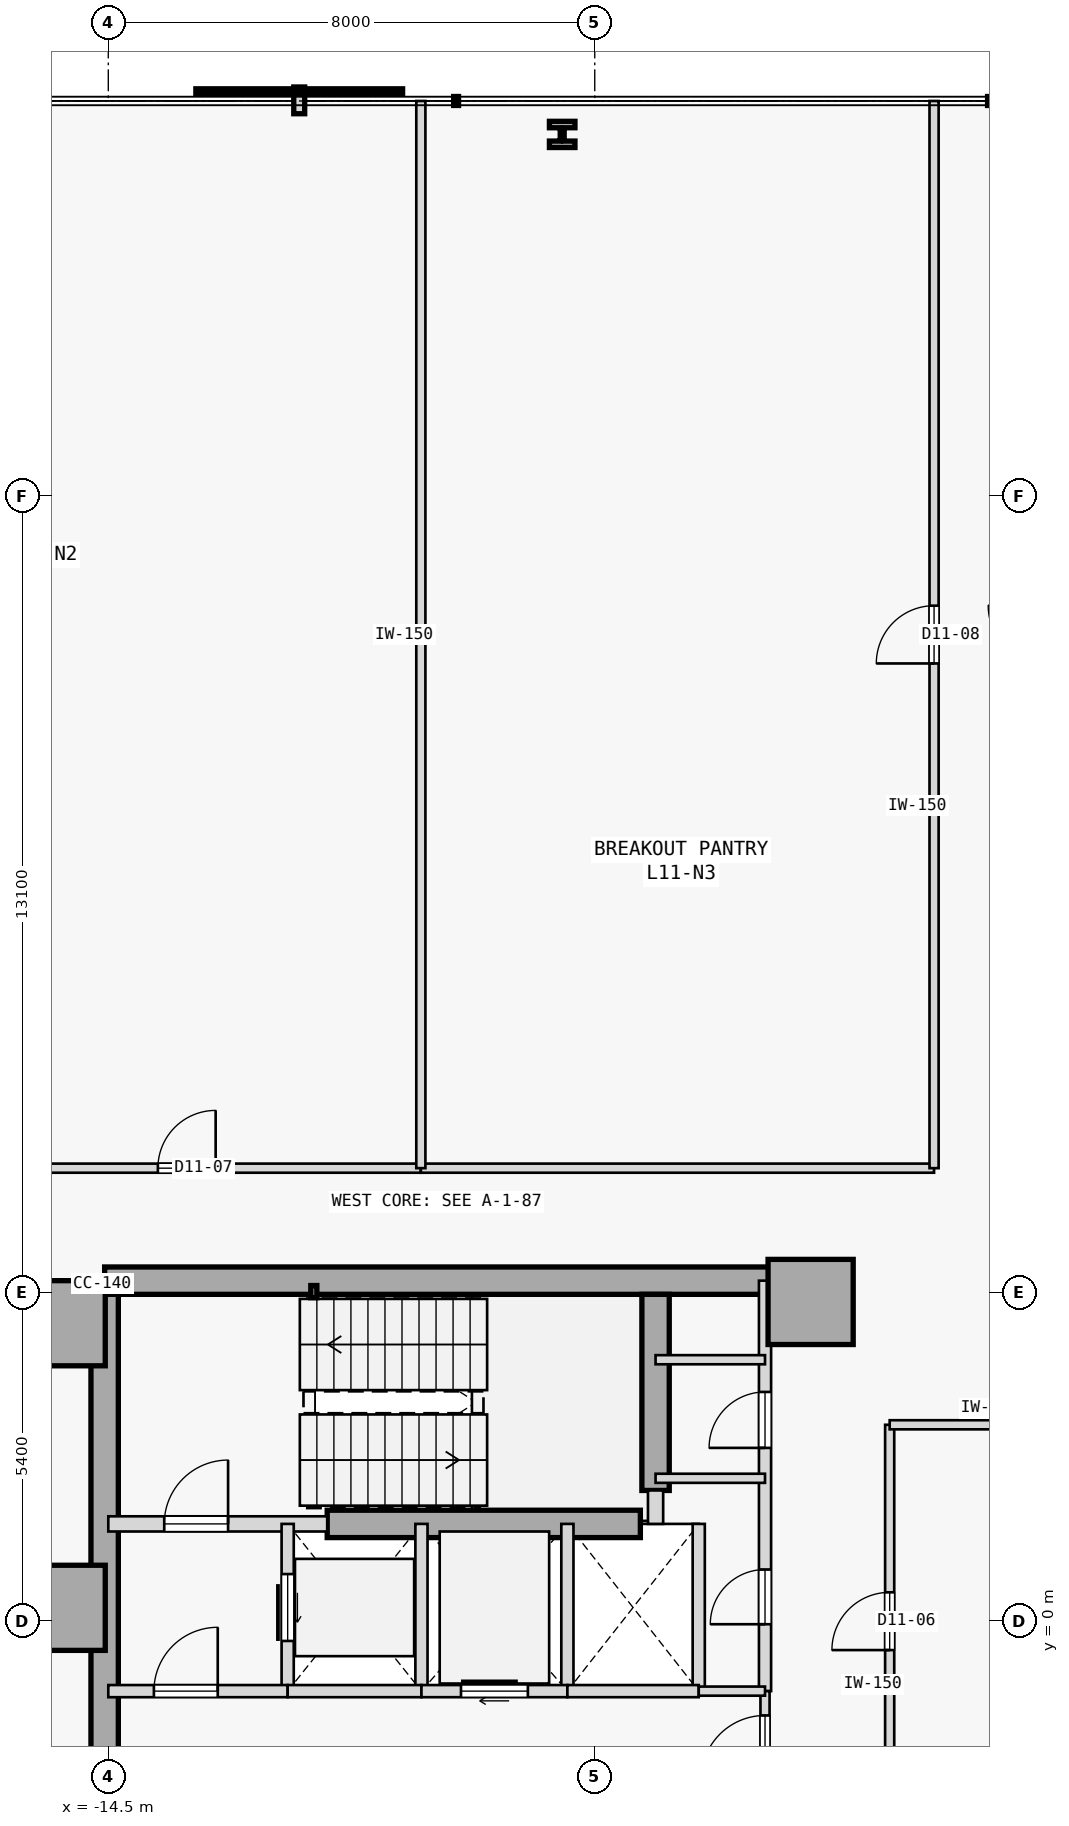
"""IFC4 building model, lengths in metres.
Left out: names, types, materials, properties, quantities, classifications, styles, units other than length and angle.
Written with IfcOpenShell. Run it as: python <this file> out.ifc"""

import sys

from ifc_helpers import new_model, si_unit, direction, frame, frame_2d, origin, origin_2d, place, context, subcontext, project, spatial, rectangle, hollow_rectangle, i_section, extrude, element, fill, save


model = new_model("IFC4")
c1 = context("Model", 3, precision=1e-05, world=origin(), true_north=direction((0.0, 1.0)))
c2 = subcontext(c1, "Body", "Model", "MODEL_VIEW")
j1 = project(units=[si_unit("LENGTHUNIT", "METRE"), si_unit("PLANEANGLEUNIT", "RADIAN")], contexts=[c1])
p1 = place(None, origin())
s1 = spatial("IfcSite", under=j1, at=p1, CompositionType="ELEMENT")
p2 = place(p1, origin())
s2 = spatial("IfcBuilding", under=s1, at=p2, CompositionType="ELEMENT")
p3 = place(p2, frame((0.0, 0.0, 48.4)))
s3 = spatial("IfcBuildingStorey", under=s2, at=p3, CompositionType="ELEMENT", Elevation=48.4)
for number, where, z_axis, x_axis in (
    (1, (-15.25, 4.9, 0.0), (0.0, 0.0, 1.0), (1.0, 0.0, 0.0)),
    (2, (-15.25, 0.22, 0.0), (0.0, 0.0, 1.0), (1.0, 0.0, 0.0)),
    (3, (-2.95, 5.25, 0.0), (0.0, 0.0, 1.0), (1.0, 0.0, 0.0)),
):
    element("IfcColumn", number, at=place(p3, frame(where, z_axis=z_axis, x_axis=x_axis)), inside=s3, PredefinedType="COLUMN", context=c2, shape_type="SweptSolid", body=[
        extrude(rectangle(XDim=1.4, YDim=1.4, at=origin_2d()), origin(), (0.0, 0.0, 1.0), 3.8),
    ])
p4 = place(p3, frame((-14.56, 5.6, 0.0), z_axis=(0.0, 0.0, 1.0), x_axis=(1.0, 0.0, 0.0)))
e4 = element("IfcWall", 4, at=p4, inside=s3, PredefinedType="SHEAR", context=c2, shape_type="SweptSolid", body=[
    extrude(rectangle(XDim=11.41, YDim=0.45, at=frame_2d((5.705, 0.0))), origin(), (0.0, 0.0, 1.0), 3.575),
])
p5 = place(p3, frame((-14.56, -5.375, 0.0), z_axis=(0.0, 0.0, 1.0), x_axis=(0.0, 1.0, 0.0)))
e5 = element("IfcWall", 5, at=p5, inside=s3, PredefinedType="SHEAR", context=c2, shape_type="SweptSolid", body=[
    extrude(rectangle(XDim=10.75, YDim=0.45, at=frame_2d((5.375, 0.0))), origin(), (0.0, 0.0, 1.0), 3.575),
])
p6 = place(p3, frame((-5.5, 2.15, 0.0), z_axis=(0.0, 0.0, 1.0), x_axis=(0.0, 1.0, 0.0)))
e6 = element("IfcWall", 6, at=p6, inside=s3, PredefinedType="SHEAR", context=c2, shape_type="SweptSolid", body=[
    extrude(rectangle(XDim=3.225, YDim=0.45, at=frame_2d((1.613, 0.0))), origin(), (0.0, 0.0, 1.0), 3.575),
])
p7 = place(p3, frame((-10.9, 1.6, 0.0), z_axis=(0.0, 0.0, 1.0), x_axis=(1.0, 0.0, 0.0)))
e7 = element("IfcWall", 7, at=p7, inside=s3, PredefinedType="SHEAR", context=c2, shape_type="SweptSolid", body=[
    extrude(rectangle(XDim=5.15, YDim=0.45, at=frame_2d((2.575, 0.0))), origin(), (0.0, 0.0, 1.0), 3.575),
])
p8 = place(p3, frame((-11.12, 5.42, 0.0), z_axis=(0.0, 0.0, 1.0), x_axis=(1.0, 0.0, 0.0)))
e8 = element("IfcColumn", 8, at=p8, inside=s3, PredefinedType="COLUMN", context=c2, shape_type="SweptSolid", body=[
    extrude(hollow_rectangle(XDim=0.1, YDim=0.2, WallThickness=0.008, at=origin_2d()), origin(), (0.0, 0.0, 1.0), 3.8),
])
p9 = place(p3, frame((-7.036, 24.45, 0.0), z_axis=(0.0, 0.0, 1.0), x_axis=(1.0, 0.0, 0.0)))
e9 = element("IfcColumn", 9, at=p9, inside=s3, PredefinedType="COLUMN", context=c2, shape_type="SweptSolid", body=[
    extrude(i_section(OverallWidth=0.42, OverallDepth=0.431, WebThickness=0.065, FlangeThickness=0.106, FilletRadius=0.015, at=origin_2d()), origin(), (0.0, 0.0, 1.0), 3.8),
])
p10 = place(p3, frame((-14.5, 1.6, 0.0), z_axis=(0.0, 0.0, 1.0), x_axis=(1.0, 0.0, 0.0)))
e10 = element("IfcWall", 10, at=p10, inside=s3, PredefinedType="STANDARD", context=c2, shape_type="SweptSolid", body=[
    extrude(rectangle(XDim=3.6, YDim=0.25, at=frame_2d((1.8, 0.0))), origin(), (0.0, 0.0, 1.0), 3.575),
])
p11 = place(p10, frame((0.92, 0.0, 0.0)))
e11 = element("IfcOpeningElement", 11, at=p11, cuts=e10, PredefinedType="OPENING", context=c2, shape_type="SweptSolid", body=[
    extrude(rectangle(XDim=1.05, YDim=2.15, at=frame_2d((0.525, 1.075))), frame((0.0, 0.135, 0.0), z_axis=(0.0, -1.0, 0.0), x_axis=(1.0, 0.0, 0.0)), (0.0, 0.0, 1.0), 0.27),
])
p12 = place(p3, frame((-5.5, 1.6, 0.0), z_axis=(0.0, 0.0, 1.0), x_axis=(0.0, 1.0, 0.0)))
e12 = element("IfcWall", 12, at=p12, inside=s3, PredefinedType="STANDARD", context=c2, shape_type="SweptSolid", body=[
    extrude(rectangle(XDim=0.55, YDim=0.25, at=frame_2d((0.275, 0.0))), origin(), (0.0, 0.0, 1.0), 3.575),
])
p13 = place(p3, frame((-3.7, -1.15, 0.0), z_axis=(0.0, 0.0, 1.0), x_axis=(0.0, 1.0, 0.0)))
e13 = element("IfcWall", 13, at=p13, inside=s3, PredefinedType="STANDARD", context=c2, shape_type="SweptSolid", body=[
    extrude(rectangle(XDim=6.75, YDim=0.2, at=frame_2d((3.375, 0.0))), origin(), (0.0, 0.0, 1.0), 3.575),
])
p14 = place(p13, frame((1.1, 0.0, 0.0)))
e14 = element("IfcOpeningElement", 14, at=p14, cuts=e13, PredefinedType="OPENING", context=c2, shape_type="SweptSolid", body=[
    extrude(rectangle(XDim=0.9, YDim=2.15, at=frame_2d((0.45, 1.075))), frame((0.0, 0.11, 0.0), z_axis=(0.0, -1.0, 0.0), x_axis=(1.0, 0.0, 0.0)), (0.0, 0.0, 1.0), 0.22),
])
p15 = place(p13, frame((4.0, 0.0, 0.0)))
e15 = element("IfcOpeningElement", 15, at=p15, cuts=e13, PredefinedType="OPENING", context=c2, shape_type="SweptSolid", body=[
    extrude(rectangle(XDim=0.92, YDim=2.15, at=frame_2d((0.46, 1.075))), frame((0.0, 0.11, 0.0), z_axis=(0.0, -1.0, 0.0), x_axis=(1.0, 0.0, 0.0)), (0.0, 0.0, 1.0), 0.22),
])
p16 = place(p3, frame((-3.7, -2.95, 0.0), z_axis=(0.0, 0.0, 1.0), x_axis=(0.0, 1.0, 0.0)))
e16 = element("IfcWall", 16, at=p16, inside=s3, PredefinedType="PARTITIONING", context=c2, shape_type="SweptSolid", body=[
    extrude(rectangle(XDim=1.8, YDim=0.15, at=frame_2d((0.9, 0.0))), origin(), (0.0, 0.0, 1.0), 3.575),
])
p17 = place(p16, frame((0.35, 0.0, 0.0)))
e17 = element("IfcOpeningElement", 17, at=p17, cuts=e16, PredefinedType="OPENING", context=c2, shape_type="SweptSolid", body=[
    extrude(rectangle(XDim=1.05, YDim=2.18, at=frame_2d((0.525, 1.09))), frame((0.0, 0.085, 0.0), z_axis=(0.0, -1.0, 0.0), x_axis=(1.0, 0.0, 0.0)), (0.0, 0.0, 1.0), 0.17),
])
p18 = place(p3, frame((-11.55, -1.15, 0.0), z_axis=(0.0, 0.0, 1.0), x_axis=(0.0, 1.0, 0.0)))
e18 = element("IfcWall", 18, at=p18, inside=s3, PredefinedType="STANDARD", context=c2, shape_type="SweptSolid", body=[
    extrude(rectangle(XDim=2.75, YDim=0.2, at=frame_2d((1.375, 0.0))), origin(), (0.0, 0.0, 1.0), 3.575),
])
p19 = place(p18, frame((0.825, 0.0, 0.0)))
e19 = element("IfcOpeningElement", 19, at=p19, cuts=e18, PredefinedType="OPENING", context=c2, shape_type="SweptSolid", body=[
    extrude(rectangle(XDim=1.1, YDim=2.15, at=frame_2d((0.55, 1.075))), frame((0.0, 0.11, 0.0), z_axis=(0.0, -1.0, 0.0), x_axis=(1.0, 0.0, 0.0)), (0.0, 0.0, 1.0), 0.22),
])
p20 = place(p3, frame((-9.35, -1.15, 0.0), z_axis=(0.0, 0.0, 1.0), x_axis=(0.0, 1.0, 0.0)))
e20 = element("IfcWall", 20, at=p20, inside=s3, PredefinedType="STANDARD", context=c2, shape_type="SweptSolid", body=[
    extrude(rectangle(XDim=2.75, YDim=0.2, at=frame_2d((1.375, 0.0))), origin(), (0.0, 0.0, 1.0), 3.575),
])
p21 = place(p3, frame((-14.5, -1.15, 0.0), z_axis=(0.0, 0.0, 1.0), x_axis=(1.0, 0.0, 0.0)))
e21 = element("IfcWall", 21, at=p21, inside=s3, PredefinedType="STANDARD", context=c2, shape_type="SweptSolid", body=[
    extrude(rectangle(XDim=2.95, YDim=0.2, at=frame_2d((1.475, 0.0))), origin(), (0.0, 0.0, 1.0), 3.575),
])
p22 = place(p21, frame((0.75, 0.0, 0.0)))
e22 = element("IfcOpeningElement", 22, at=p22, cuts=e21, PredefinedType="OPENING", context=c2, shape_type="SweptSolid", body=[
    extrude(rectangle(XDim=1.05, YDim=2.18, at=frame_2d((0.525, 1.09))), frame((0.0, 0.11, 0.0), z_axis=(0.0, -1.0, 0.0), x_axis=(1.0, 0.0, 0.0)), (0.0, 0.0, 1.0), 0.22),
])
p23 = place(p3, frame((-11.55, -1.15, 0.0), z_axis=(0.0, 0.0, 1.0), x_axis=(1.0, 0.0, 0.0)))
e23 = element("IfcWall", 23, at=p23, inside=s3, PredefinedType="STANDARD", context=c2, shape_type="SweptSolid", body=[
    extrude(rectangle(XDim=2.2, YDim=0.2, at=frame_2d((1.1, 0.0))), origin(), (0.0, 0.0, 1.0), 3.575),
])
p24 = place(p3, frame((-6.95, -1.15, 0.0), z_axis=(0.0, 0.0, 1.0), x_axis=(0.0, 1.0, 0.0)))
e24 = element("IfcWall", 24, at=p24, inside=s3, PredefinedType="STANDARD", context=c2, shape_type="SweptSolid", body=[
    extrude(rectangle(XDim=2.75, YDim=0.2, at=frame_2d((1.375, 0.0))), origin(), (0.0, 0.0, 1.0), 3.575),
])
p25 = place(p3, frame((-9.35, -1.15, 0.0), z_axis=(0.0, 0.0, 1.0), x_axis=(1.0, 0.0, 0.0)))
e25 = element("IfcWall", 25, at=p25, inside=s3, PredefinedType="STANDARD", context=c2, shape_type="SweptSolid", body=[
    extrude(rectangle(XDim=2.4, YDim=0.2, at=frame_2d((1.2, 0.0))), origin(), (0.0, 0.0, 1.0), 3.575),
])
p26 = place(p25, frame((0.65, 0.0, 0.0)))
e26 = element("IfcOpeningElement", 26, at=p26, cuts=e25, PredefinedType="OPENING", context=c2, shape_type="SweptSolid", body=[
    extrude(rectangle(XDim=1.1, YDim=2.15, at=frame_2d((0.55, 1.075))), frame((0.0, 0.11, 0.0), z_axis=(0.0, -1.0, 0.0), x_axis=(1.0, 0.0, 0.0)), (0.0, 0.0, 1.0), 0.22),
])
p27 = place(p3, frame((-4.79, -1.15, 0.0), z_axis=(0.0, 0.0, 1.0), x_axis=(0.0, 1.0, 0.0)))
e27 = element("IfcWall", 27, at=p27, inside=s3, PredefinedType="STANDARD", context=c2, shape_type="SweptSolid", body=[
    extrude(rectangle(XDim=2.75, YDim=0.2, at=frame_2d((1.375, 0.0))), origin(), (0.0, 0.0, 1.0), 3.575),
])
p28 = place(p3, frame((-6.95, -1.15, 0.0), z_axis=(0.0, 0.0, 1.0), x_axis=(1.0, 0.0, 0.0)))
e28 = element("IfcWall", 28, at=p28, inside=s3, PredefinedType="STANDARD", context=c2, shape_type="SweptSolid", body=[
    extrude(rectangle(XDim=2.16, YDim=0.2, at=frame_2d((1.08, 0.0))), origin(), (0.0, 0.0, 1.0), 3.575),
])
p29 = place(p3, frame((-4.79, -1.15, 0.0), z_axis=(0.0, 0.0, 1.0), x_axis=(1.0, 0.0, 0.0)))
e29 = element("IfcWall", 29, at=p29, inside=s3, PredefinedType="PARTITIONING", context=c2, shape_type="SweptSolid", body=[
    extrude(rectangle(XDim=1.09, YDim=0.15, at=frame_2d((0.545, 0.0))), origin(), (0.0, 0.0, 1.0), 3.575),
])
for number, where, z_axis, x_axis in (
    (30, (-5.5, 4.3, 0.0), (0.0, 0.0, 1.0), (1.0, 0.0, 0.0)),
    (31, (-5.5, 2.35, 0.0), (0.0, 0.0, 1.0), (1.0, 0.0, 0.0)),
):
    element("IfcWall", number, at=place(p3, frame(where, z_axis=z_axis, x_axis=x_axis)), inside=s3, PredefinedType="PARTITIONING", context=c2, shape_type="SweptSolid", body=[
        extrude(rectangle(XDim=1.8, YDim=0.15, at=frame_2d((0.9, 0.0))), origin(), (0.0, 0.0, 1.0), 3.575),
    ])
p30 = place(p3, frame((-1.65, -3.23, 0.0), z_axis=(0.0, 0.0, 1.0), x_axis=(0.0, 1.0, 0.0)))
e32 = element("IfcWall", 32, at=p30, inside=s3, PredefinedType="PARTITIONING", context=c2, shape_type="SweptSolid", body=[
    extrude(rectangle(XDim=6.46, YDim=0.15, at=frame_2d((3.23, 0.0))), origin(), (0.0, 0.0, 1.0), 3.575),
])
p31 = place(p30, frame((2.755, 0.0, 0.0)))
e33 = element("IfcOpeningElement", 33, at=p31, cuts=e32, PredefinedType="OPENING", context=c2, shape_type="SweptSolid", body=[
    extrude(rectangle(XDim=0.95, YDim=2.15, at=frame_2d((0.475, 1.075))), frame((0.0, 0.085, 0.0), z_axis=(0.0, -1.0, 0.0), x_axis=(1.0, 0.0, 0.0)), (0.0, 0.0, 1.0), 0.17),
])
p32 = place(p3, frame((-1.65, 3.23, 0.0), z_axis=(0.0, 0.0, 1.0), x_axis=(1.0, 0.0, 0.0)))
e34 = element("IfcWall", 34, at=p32, inside=s3, PredefinedType="PARTITIONING", context=c2, shape_type="SweptSolid", body=[
    extrude(rectangle(XDim=3.3, YDim=0.15, at=frame_2d((1.65, 0.0))), origin(), (0.0, 0.0, 1.0), 3.575),
])
p33 = place(p3, frame((-17.059, 7.45, 0.0), z_axis=(0.0, 0.0, 1.0), x_axis=(1.0, 0.0, 0.0)))
e35 = element("IfcWall", 35, at=p33, inside=s3, PredefinedType="PARTITIONING", context=c2, shape_type="SweptSolid", body=[
    extrude(rectangle(XDim=7.699, YDim=0.15, at=frame_2d((3.85, 0.0))), origin(), (0.0, 0.0, 1.0), 3.575),
])
p34 = place(p33, frame((3.375, 0.0, 0.0)))
e36 = element("IfcOpeningElement", 36, at=p34, cuts=e35, PredefinedType="OPENING", context=c2, shape_type="SweptSolid", body=[
    extrude(rectangle(XDim=0.95, YDim=2.15, at=frame_2d((0.475, 1.075))), frame((0.0, 0.085, 0.0), z_axis=(0.0, -1.0, 0.0), x_axis=(1.0, 0.0, 0.0)), (0.0, 0.0, 1.0), 0.17),
])
p35 = place(p3, frame((-9.36, 7.45, 0.0), z_axis=(0.0, 0.0, 1.0), x_axis=(1.0, 0.0, 0.0)))
e37 = element("IfcWall", 37, at=p35, inside=s3, PredefinedType="PARTITIONING", context=c2, shape_type="SweptSolid", body=[
    extrude(rectangle(XDim=8.44, YDim=0.15, at=frame_2d((4.22, 0.0))), origin(), (0.0, 0.0, 1.0), 3.575),
])
p36 = place(p3, frame((-0.92, 7.45, 0.0), z_axis=(0.0, 0.0, 1.0), x_axis=(0.0, 1.0, 0.0)))
e38 = element("IfcWall", 38, at=p36, inside=s3, PredefinedType="PARTITIONING", context=c2, shape_type="SweptSolid", body=[
    extrude(rectangle(XDim=17.55, YDim=0.15, at=frame_2d((8.775, 0.0))), origin(), (0.0, 0.0, 1.0), 3.575),
])
p37 = place(p36, frame((8.3, 0.0, 0.0)))
e39 = element("IfcOpeningElement", 39, at=p37, cuts=e38, PredefinedType="OPENING", context=c2, shape_type="SweptSolid", body=[
    extrude(rectangle(XDim=0.95, YDim=2.15, at=frame_2d((0.475, 1.075))), frame((0.0, 0.085, 0.0), z_axis=(0.0, -1.0, 0.0), x_axis=(1.0, 0.0, 0.0)), (0.0, 0.0, 1.0), 0.17),
])
p38 = place(p3, frame((-9.36, 7.45, 0.0), z_axis=(0.0, 0.0, 1.0), x_axis=(0.0, 1.0, 0.0)))
e40 = element("IfcWall", 40, at=p38, inside=s3, PredefinedType="PARTITIONING", context=c2, shape_type="SweptSolid", body=[
    extrude(rectangle(XDim=17.55, YDim=0.15, at=frame_2d((8.775, 0.0))), origin(), (0.0, 0.0, 1.0), 3.575),
])
p39 = place(p11, origin())
e41 = element("IfcDoor", 41, at=p39, inside=s3, OperationType="SINGLE_SWING_RIGHT", PredefinedType="DOOR", context=c2, shape_type="SweptSolid", body=[
    extrude(rectangle(XDim=1.05, YDim=2.15, at=frame_2d((0.525, 1.075))), frame((0.0, 0.025, 0.0), z_axis=(0.0, -1.0, 0.0), x_axis=(1.0, 0.0, 0.0)), (0.0, 0.0, 1.0), 0.05),
])
fill(e11, e41)
p40 = place(p22, origin())
e42 = element("IfcDoor", 42, at=p40, inside=s3, OperationType="SINGLE_SWING_RIGHT", PredefinedType="DOOR", context=c2, shape_type="SweptSolid", body=[
    extrude(rectangle(XDim=1.05, YDim=2.18, at=frame_2d((0.525, 1.09))), frame((0.0, 0.025, 0.0), z_axis=(0.0, -1.0, 0.0), x_axis=(1.0, 0.0, 0.0)), (0.0, 0.0, 1.0), 0.05),
])
fill(e22, e42)
p41 = place(p17, origin())
e43 = element("IfcDoor", 43, at=p41, inside=s3, OperationType="SINGLE_SWING_LEFT", PredefinedType="DOOR", context=c2, shape_type="SweptSolid", body=[
    extrude(rectangle(XDim=1.05, YDim=2.18, at=frame_2d((0.525, 1.09))), frame((0.0, 0.025, 0.0), z_axis=(0.0, -1.0, 0.0), x_axis=(1.0, 0.0, 0.0)), (0.0, 0.0, 1.0), 0.05),
])
fill(e17, e43)
p42 = place(p19, origin())
e44 = element("IfcDoor", 44, at=p42, inside=s3, OperationType="SLIDING_TO_RIGHT", PredefinedType="DOOR", context=c2, shape_type="SweptSolid", body=[
    extrude(rectangle(XDim=1.1, YDim=2.15, at=frame_2d((0.55, 1.075))), frame((0.0, 0.025, 0.0), z_axis=(0.0, -1.0, 0.0), x_axis=(1.0, 0.0, 0.0)), (0.0, 0.0, 1.0), 0.05),
])
fill(e19, e44)
p43 = place(p26, origin())
e45 = element("IfcDoor", 45, at=p43, inside=s3, OperationType="SLIDING_TO_RIGHT", PredefinedType="DOOR", context=c2, shape_type="SweptSolid", body=[
    extrude(rectangle(XDim=1.1, YDim=2.15, at=frame_2d((0.55, 1.075))), frame((0.0, 0.025, 0.0), z_axis=(0.0, -1.0, 0.0), x_axis=(1.0, 0.0, 0.0)), (0.0, 0.0, 1.0), 0.05),
])
fill(e26, e45)
p44 = place(p14, origin())
e46 = element("IfcDoor", 46, at=p44, inside=s3, OperationType="SINGLE_SWING_LEFT", PredefinedType="DOOR", context=c2, shape_type="SweptSolid", body=[
    extrude(rectangle(XDim=0.9, YDim=2.15, at=frame_2d((0.45, 1.075))), frame((0.0, 0.025, 0.0), z_axis=(0.0, -1.0, 0.0), x_axis=(1.0, 0.0, 0.0)), (0.0, 0.0, 1.0), 0.05),
])
fill(e14, e46)
p45 = place(p15, origin())
e47 = element("IfcDoor", 47, at=p45, inside=s3, OperationType="SINGLE_SWING_LEFT", PredefinedType="DOOR", context=c2, shape_type="SweptSolid", body=[
    extrude(rectangle(XDim=0.92, YDim=2.15, at=frame_2d((0.46, 1.075))), frame((0.0, 0.025, 0.0), z_axis=(0.0, -1.0, 0.0), x_axis=(1.0, 0.0, 0.0)), (0.0, 0.0, 1.0), 0.05),
])
fill(e15, e47)
p46 = place(p31, origin())
e48 = element("IfcDoor", 48, at=p46, inside=s3, OperationType="SINGLE_SWING_LEFT", PredefinedType="DOOR", context=c2, shape_type="SweptSolid", body=[
    extrude(rectangle(XDim=0.95, YDim=2.15, at=frame_2d((0.475, 1.075))), frame((0.0, 0.025, 0.0), z_axis=(0.0, -1.0, 0.0), x_axis=(1.0, 0.0, 0.0)), (0.0, 0.0, 1.0), 0.05),
])
fill(e33, e48)
p47 = place(p34, origin())
e49 = element("IfcDoor", 49, at=p47, inside=s3, OperationType="SINGLE_SWING_RIGHT", PredefinedType="DOOR", context=c2, shape_type="SweptSolid", body=[
    extrude(rectangle(XDim=0.95, YDim=2.15, at=frame_2d((0.475, 1.075))), frame((0.0, 0.025, 0.0), z_axis=(0.0, -1.0, 0.0), x_axis=(1.0, 0.0, 0.0)), (0.0, 0.0, 1.0), 0.05),
])
fill(e36, e49)
p48 = place(p37, origin())
e50 = element("IfcDoor", 50, at=p48, inside=s3, OperationType="SINGLE_SWING_LEFT", PredefinedType="DOOR", context=c2, shape_type="SweptSolid", body=[
    extrude(rectangle(XDim=0.95, YDim=2.15, at=frame_2d((0.475, 1.075))), frame((0.0, 0.025, 0.0), z_axis=(0.0, -1.0, 0.0), x_axis=(1.0, 0.0, 0.0)), (0.0, 0.0, 1.0), 0.05),
])
fill(e39, e50)
save(model, sys.argv[1])
